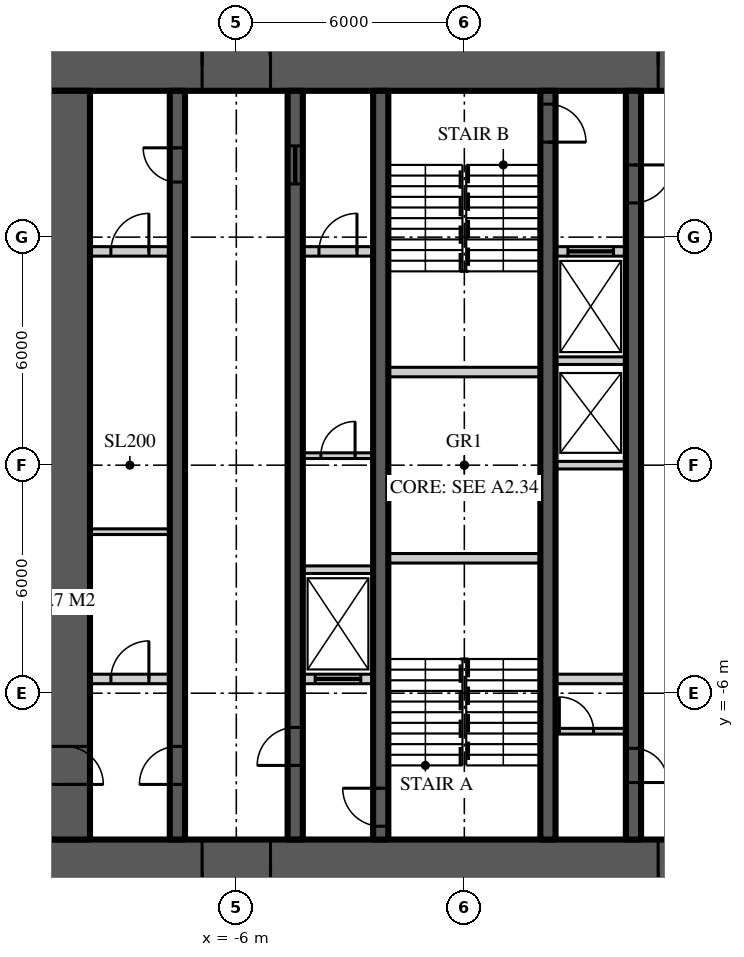
"""IFC4 building model, lengths in metres.
Left out: names, types, materials, properties, quantities, classifications, styles, units other than length and angle.
Written with IfcOpenShell. Run it as: python <this file> out.ifc"""

import sys

from ifc_helpers import new_model, si_unit, direction, frame, frame_2d, origin, place, context, subcontext, project, spatial, rectangle, extrude, element, fill, save


model = new_model("IFC4")
c1 = context("Model", 3, precision=1e-05, world=origin(), true_north=direction((0.0, 1.0)))
c2 = subcontext(c1, "Body", "Model", "MODEL_VIEW")
j1 = project(units=[si_unit("LENGTHUNIT", "METRE"), si_unit("PLANEANGLEUNIT", "RADIAN")], contexts=[c1])
p1 = place(None, origin())
s1 = spatial("IfcSite", under=j1, at=p1, CompositionType="ELEMENT")
p2 = place(p1, origin())
s2 = spatial("IfcBuilding", under=s1, at=p2, CompositionType="ELEMENT")
p3 = place(p2, frame((0.0, 0.0, 263.4)))
s3 = spatial("IfcBuildingStorey", under=s2, at=p3, CompositionType="ELEMENT", Elevation=263.4)
p4 = place(p3, frame((-11.15, 10.5, 0.0), z_axis=(0.0, 0.0, 1.0), x_axis=(1.0, 0.0, 0.0)))
e1 = element("IfcWall", 1, at=p4, inside=s3, PredefinedType="SHEAR", context=c2, shape_type="SweptSolid", body=[
    extrude(rectangle(XDim=22.3, YDim=1.3, at=frame_2d((11.15, 0.0))), origin(), (0.0, 0.0, 1.0), 3.9),
])
p5 = place(p4, frame((4.25, 0.0, 0.0)))
e2 = element("IfcOpeningElement", 2, at=p5, cuts=e1, PredefinedType="OPENING", context=c2, shape_type="SweptSolid", body=[
    extrude(rectangle(XDim=1.8, YDim=2.2, at=frame_2d((0.9, 1.1))), frame((0.0, 0.66, 0.0), z_axis=(0.0, -1.0, 0.0), x_axis=(1.0, 0.0, 0.0)), (0.0, 0.0, 1.0), 1.32),
])
p6 = place(p4, frame((16.25, 0.0, 0.0)))
e3 = element("IfcOpeningElement", 3, at=p6, cuts=e1, PredefinedType="OPENING", context=c2, shape_type="SweptSolid", body=[
    extrude(rectangle(XDim=1.8, YDim=2.2, at=frame_2d((0.9, 1.1))), frame((0.0, 0.66, 0.0), z_axis=(0.0, -1.0, 0.0), x_axis=(1.0, 0.0, 0.0)), (0.0, 0.0, 1.0), 1.32),
])
p7 = place(p3, frame((11.15, -10.5, 0.0), z_axis=(0.0, 0.0, 1.0), x_axis=(-1.0, 0.0, 0.0)))
e4 = element("IfcWall", 4, at=p7, inside=s3, PredefinedType="SHEAR", context=c2, shape_type="SweptSolid", body=[
    extrude(rectangle(XDim=22.3, YDim=1.3, at=frame_2d((11.15, 0.0))), origin(), (0.0, 0.0, 1.0), 3.9),
])
p8 = place(p7, frame((16.25, 0.0, 0.0)))
e5 = element("IfcOpeningElement", 5, at=p8, cuts=e4, PredefinedType="OPENING", context=c2, shape_type="SweptSolid", body=[
    extrude(rectangle(XDim=1.8, YDim=2.2, at=frame_2d((0.9, 1.1))), frame((0.0, 0.66, 0.0), z_axis=(0.0, -1.0, 0.0), x_axis=(1.0, 0.0, 0.0)), (0.0, 0.0, 1.0), 1.32),
])
p9 = place(p7, frame((4.25, 0.0, 0.0)))
e6 = element("IfcOpeningElement", 6, at=p9, cuts=e4, PredefinedType="OPENING", context=c2, shape_type="SweptSolid", body=[
    extrude(rectangle(XDim=1.8, YDim=2.2, at=frame_2d((0.9, 1.1))), frame((0.0, 0.66, 0.0), z_axis=(0.0, -1.0, 0.0), x_axis=(1.0, 0.0, 0.0)), (0.0, 0.0, 1.0), 1.32),
])
p10 = place(p3, frame((-10.5, 9.85, 0.0), z_axis=(0.0, 0.0, 1.0), x_axis=(0.0, -1.0, 0.0)))
e7 = element("IfcWall", 7, at=p10, inside=s3, PredefinedType="SHEAR", context=c2, shape_type="SweptSolid", body=[
    extrude(rectangle(XDim=19.7, YDim=1.3, at=frame_2d((9.85, 0.0))), origin(), (0.0, 0.0, 1.0), 3.9),
])
p11 = place(p10, frame((17.25, 0.0, 0.0)))
e8 = element("IfcOpeningElement", 8, at=p11, cuts=e7, PredefinedType="OPENING", context=c2, shape_type="SweptSolid", body=[
    extrude(rectangle(XDim=1.0, YDim=2.2, at=frame_2d((0.5, 1.1))), frame((0.0, 0.66, 0.0), z_axis=(0.0, -1.0, 0.0), x_axis=(1.0, 0.0, 0.0)), (0.0, 0.0, 1.0), 1.32),
])
p12 = place(p3, frame((-7.55, -9.85, 0.0), z_axis=(0.0, 0.0, 1.0), x_axis=(0.0, 1.0, 0.0)))
e9 = element("IfcWall", 9, at=p12, inside=s3, PredefinedType="SHEAR", context=c2, shape_type="SweptSolid", body=[
    extrude(rectangle(XDim=19.7, YDim=0.4, at=frame_2d((9.85, 0.0))), origin(), (0.0, 0.0, 1.0), 3.9),
])
p13 = place(p12, frame((1.45, 0.0, 0.0)))
e10 = element("IfcOpeningElement", 10, at=p13, cuts=e9, PredefinedType="OPENING", context=c2, shape_type="SweptSolid", body=[
    extrude(rectangle(XDim=1.0, YDim=2.2, at=frame_2d((0.5, 1.1))), frame((0.0, 0.21, 0.0), z_axis=(0.0, -1.0, 0.0), x_axis=(1.0, 0.0, 0.0)), (0.0, 0.0, 1.0), 0.42),
])
p14 = place(p12, frame((17.3, 0.0, 0.0)))
e11 = element("IfcOpeningElement", 11, at=p14, cuts=e9, PredefinedType="OPENING", context=c2, shape_type="SweptSolid", body=[
    extrude(rectangle(XDim=0.9, YDim=2.1, at=frame_2d((0.45, 1.05))), frame((0.0, 0.21, 0.0), z_axis=(0.0, -1.0, 0.0), x_axis=(1.0, 0.0, 0.0)), (0.0, 0.0, 1.0), 0.42),
])
p15 = place(p3, frame((-4.45, -9.85, 0.0), z_axis=(0.0, 0.0, 1.0), x_axis=(0.0, 1.0, 0.0)))
e12 = element("IfcWall", 12, at=p15, inside=s3, PredefinedType="SHEAR", context=c2, shape_type="SweptSolid", body=[
    extrude(rectangle(XDim=19.7, YDim=0.4, at=frame_2d((9.85, 0.0))), origin(), (0.0, 0.0, 1.0), 3.9),
])
p16 = place(p15, frame((1.95, 0.0, 0.0)))
e13 = element("IfcOpeningElement", 13, at=p16, cuts=e12, PredefinedType="OPENING", context=c2, shape_type="SweptSolid", body=[
    extrude(rectangle(XDim=1.0, YDim=2.2, at=frame_2d((0.5, 1.1))), frame((0.0, 0.21, 0.0), z_axis=(0.0, -1.0, 0.0), x_axis=(1.0, 0.0, 0.0)), (0.0, 0.0, 1.0), 0.42),
])
p17 = place(p15, frame((17.25, 0.0, 0.0)))
e14 = element("IfcOpeningElement", 14, at=p17, cuts=e12, PredefinedType="OPENING", context=c2, shape_type="SweptSolid", body=[
    extrude(rectangle(XDim=1.0, YDim=2.1, at=frame_2d((0.5, 1.05))), frame((0.0, 0.21, 0.0), z_axis=(0.0, -1.0, 0.0), x_axis=(1.0, 0.0, 0.0)), (0.0, 0.0, 1.0), 0.42),
])
p18 = place(p3, frame((4.45, 9.85, 0.0), z_axis=(0.0, 0.0, 1.0), x_axis=(0.0, -1.0, 0.0)))
e15 = element("IfcWall", 15, at=p18, inside=s3, PredefinedType="SHEAR", context=c2, shape_type="SweptSolid", body=[
    extrude(rectangle(XDim=19.7, YDim=0.4, at=frame_2d((9.85, 0.0))), origin(), (0.0, 0.0, 1.0), 3.9),
])
p19 = place(p18, frame((1.95, 0.0, 0.0)))
e16 = element("IfcOpeningElement", 16, at=p19, cuts=e15, PredefinedType="OPENING", context=c2, shape_type="SweptSolid", body=[
    extrude(rectangle(XDim=1.0, YDim=2.2, at=frame_2d((0.5, 1.1))), frame((0.0, 0.21, 0.0), z_axis=(0.0, -1.0, 0.0), x_axis=(1.0, 0.0, 0.0)), (0.0, 0.0, 1.0), 0.42),
])
p20 = place(p18, frame((17.3, 0.0, 0.0)))
e17 = element("IfcOpeningElement", 17, at=p20, cuts=e15, PredefinedType="OPENING", context=c2, shape_type="SweptSolid", body=[
    extrude(rectangle(XDim=0.9, YDim=2.1, at=frame_2d((0.45, 1.05))), frame((0.0, 0.21, 0.0), z_axis=(0.0, -1.0, 0.0), x_axis=(1.0, 0.0, 0.0)), (0.0, 0.0, 1.0), 0.42),
])
p21 = place(p3, frame((-2.2, -9.85, 0.0), z_axis=(0.0, 0.0, 1.0), x_axis=(0.0, 1.0, 0.0)))
e18 = element("IfcWall", 18, at=p21, inside=s3, PredefinedType="SHEAR", context=c2, shape_type="SweptSolid", body=[
    extrude(rectangle(XDim=19.7, YDim=0.4, at=frame_2d((9.85, 0.0))), origin(), (0.0, 0.0, 1.0), 3.9),
])
p22 = place(p21, frame((0.35, 0.0, 0.0)))
e19 = element("IfcOpeningElement", 19, at=p22, cuts=e18, PredefinedType="OPENING", context=c2, shape_type="SweptSolid", body=[
    extrude(rectangle(XDim=1.0, YDim=2.2, at=frame_2d((0.5, 1.1))), frame((0.0, 0.21, 0.0), z_axis=(0.0, -1.0, 0.0), x_axis=(1.0, 0.0, 0.0)), (0.0, 0.0, 1.0), 0.42),
])
p23 = place(p3, frame((2.2, 9.85, 0.0), z_axis=(0.0, 0.0, 1.0), x_axis=(0.0, -1.0, 0.0)))
e20 = element("IfcWall", 20, at=p23, inside=s3, PredefinedType="SHEAR", context=c2, shape_type="SweptSolid", body=[
    extrude(rectangle(XDim=19.7, YDim=0.4, at=frame_2d((9.85, 0.0))), origin(), (0.0, 0.0, 1.0), 3.9),
])
p24 = place(p23, frame((0.35, 0.0, 0.0)))
e21 = element("IfcOpeningElement", 21, at=p24, cuts=e20, PredefinedType="OPENING", context=c2, shape_type="SweptSolid", body=[
    extrude(rectangle(XDim=1.0, YDim=2.2, at=frame_2d((0.5, 1.1))), frame((0.0, 0.21, 0.0), z_axis=(0.0, -1.0, 0.0), x_axis=(1.0, 0.0, 0.0)), (0.0, 0.0, 1.0), 0.42),
])
p25 = place(p3, frame((-9.85, 5.625, 0.0), z_axis=(0.0, 0.0, 1.0), x_axis=(1.0, 0.0, 0.0)))
e22 = element("IfcWall", 22, at=p25, inside=s3, PredefinedType="SOLIDWALL", context=c2, shape_type="SweptSolid", body=[
    extrude(rectangle(XDim=2.1, YDim=0.25, at=frame_2d((1.05, 0.0))), origin(), (0.0, 0.0, 1.0), 3.7),
])
p26 = place(p25, frame((0.55, 0.0, 0.0)))
e23 = element("IfcOpeningElement", 23, at=p26, cuts=e22, PredefinedType="OPENING", context=c2, shape_type="SweptSolid", body=[
    extrude(rectangle(XDim=1.0, YDim=2.2, at=frame_2d((0.5, 1.1))), frame((0.0, 0.135, 0.0), z_axis=(0.0, -1.0, 0.0), x_axis=(1.0, 0.0, 0.0)), (0.0, 0.0, 1.0), 0.27),
])
p27 = place(p3, frame((-4.25, 5.625, 0.0), z_axis=(0.0, 0.0, 1.0), x_axis=(1.0, 0.0, 0.0)))
e24 = element("IfcWall", 24, at=p27, inside=s3, PredefinedType="SOLIDWALL", context=c2, shape_type="SweptSolid", body=[
    extrude(rectangle(XDim=1.85, YDim=0.25, at=frame_2d((0.925, 0.0))), origin(), (0.0, 0.0, 1.0), 3.7),
])
p28 = place(p27, frame((0.425, 0.0, 0.0)))
e25 = element("IfcOpeningElement", 25, at=p28, cuts=e24, PredefinedType="OPENING", context=c2, shape_type="SweptSolid", body=[
    extrude(rectangle(XDim=1.0, YDim=2.2, at=frame_2d((0.5, 1.1))), frame((0.0, 0.135, 0.0), z_axis=(0.0, -1.0, 0.0), x_axis=(1.0, 0.0, 0.0)), (0.0, 0.0, 1.0), 0.27),
])
p29 = place(p3, frame((2.4, 5.625, 0.0), z_axis=(0.0, 0.0, 1.0), x_axis=(1.0, 0.0, 0.0)))
e26 = element("IfcWall", 26, at=p29, inside=s3, PredefinedType="SOLIDWALL", context=c2, shape_type="SweptSolid", body=[
    extrude(rectangle(XDim=1.85, YDim=0.25, at=frame_2d((0.925, 0.0))), origin(), (0.0, 0.0, 1.0), 3.7),
])
p30 = place(p29, frame((0.325, 0.0, 0.0)))
e27 = element("IfcOpeningElement", 27, at=p30, cuts=e26, PredefinedType="OPENING", context=c2, shape_type="SweptSolid", body=[
    extrude(rectangle(XDim=1.2, YDim=2.2, at=frame_2d((0.6, 1.1))), frame((0.0, 0.135, 0.0), z_axis=(0.0, -1.0, 0.0), x_axis=(1.0, 0.0, 0.0)), (0.0, 0.0, 1.0), 0.27),
])
p31 = place(p3, frame((-9.85, -5.625, 0.0), z_axis=(0.0, 0.0, 1.0), x_axis=(1.0, 0.0, 0.0)))
e28 = element("IfcWall", 28, at=p31, inside=s3, PredefinedType="SOLIDWALL", context=c2, shape_type="SweptSolid", body=[
    extrude(rectangle(XDim=2.1, YDim=0.25, at=frame_2d((1.05, 0.0))), origin(), (0.0, 0.0, 1.0), 3.7),
])
p32 = place(p31, frame((0.55, 0.0, 0.0)))
e29 = element("IfcOpeningElement", 29, at=p32, cuts=e28, PredefinedType="OPENING", context=c2, shape_type="SweptSolid", body=[
    extrude(rectangle(XDim=1.0, YDim=2.2, at=frame_2d((0.5, 1.1))), frame((0.0, 0.135, 0.0), z_axis=(0.0, -1.0, 0.0), x_axis=(1.0, 0.0, 0.0)), (0.0, 0.0, 1.0), 0.27),
])
p33 = place(p3, frame((-4.25, -5.625, 0.0), z_axis=(0.0, 0.0, 1.0), x_axis=(1.0, 0.0, 0.0)))
e30 = element("IfcWall", 30, at=p33, inside=s3, PredefinedType="SOLIDWALL", context=c2, shape_type="SweptSolid", body=[
    extrude(rectangle(XDim=1.85, YDim=0.25, at=frame_2d((0.925, 0.0))), origin(), (0.0, 0.0, 1.0), 3.7),
])
p34 = place(p33, frame((0.325, 0.0, 0.0)))
e31 = element("IfcOpeningElement", 31, at=p34, cuts=e30, PredefinedType="OPENING", context=c2, shape_type="SweptSolid", body=[
    extrude(rectangle(XDim=1.2, YDim=2.2, at=frame_2d((0.6, 1.1))), frame((0.0, 0.135, 0.0), z_axis=(0.0, -1.0, 0.0), x_axis=(1.0, 0.0, 0.0)), (0.0, 0.0, 1.0), 0.27),
])
p35 = place(p3, frame((2.4, -5.625, 0.0), z_axis=(0.0, 0.0, 1.0), x_axis=(1.0, 0.0, 0.0)))
e32 = element("IfcWall", 32, at=p35, inside=s3, PredefinedType="SOLIDWALL", context=c2, shape_type="SweptSolid", body=[
    extrude(rectangle(XDim=1.85, YDim=0.25, at=frame_2d((0.925, 0.0))), origin(), (0.0, 0.0, 1.0), 3.7),
])
for number, where, z_axis, x_axis in (
    (33, (-2.0, -2.45, 0.0), (0.0, 0.0, 1.0), (1.0, 0.0, 0.0)),
    (34, (-2.0, 2.45, 0.0), (0.0, 0.0, 1.0), (1.0, 0.0, 0.0)),
):
    element("IfcWall", number, at=place(p3, frame(where, z_axis=z_axis, x_axis=x_axis)), inside=s3, PredefinedType="SOLIDWALL", context=c2, shape_type="SweptSolid", body=[
        extrude(rectangle(XDim=4.0, YDim=0.25, at=frame_2d((2.0, 0.0))), origin(), (0.0, 0.0, 1.0), 3.7),
    ])
for number, where, z_axis, x_axis in (
    (35, (-4.25, -2.75, 0.0), (0.0, 0.0, 1.0), (1.0, 0.0, 0.0)),
    (36, (2.4, 0.0, 0.0), (0.0, 0.0, 1.0), (1.0, 0.0, 0.0)),
    (37, (2.4, 2.75, 0.0), (0.0, 0.0, 1.0), (1.0, 0.0, 0.0)),
):
    element("IfcWall", number, at=place(p3, frame(where, z_axis=z_axis, x_axis=x_axis)), inside=s3, PredefinedType="SOLIDWALL", context=c2, shape_type="SweptSolid", body=[
        extrude(rectangle(XDim=1.85, YDim=0.2, at=frame_2d((0.925, 0.0))), origin(), (0.0, 0.0, 1.0), 3.7),
    ])
p36 = place(p3, frame((-9.85, -1.75, 0.0), z_axis=(0.0, 0.0, 1.0), x_axis=(1.0, 0.0, 0.0)))
e38 = element("IfcWall", 38, at=p36, inside=s3, PredefinedType="SOLIDWALL", context=c2, shape_type="SweptSolid", body=[
    extrude(rectangle(XDim=2.1, YDim=0.15, at=frame_2d((1.05, 0.0))), origin(), (0.0, 0.0, 1.0), 3.77),
])
p37 = place(p3, frame((-4.25, 0.25, 0.0), z_axis=(0.0, 0.0, 1.0), x_axis=(1.0, 0.0, 0.0)))
e39 = element("IfcWall", 39, at=p37, inside=s3, PredefinedType="SOLIDWALL", context=c2, shape_type="SweptSolid", body=[
    extrude(rectangle(XDim=1.85, YDim=0.15, at=frame_2d((0.925, 0.0))), origin(), (0.0, 0.0, 1.0), 3.77),
])
p38 = place(p37, frame((0.475, 0.0, 0.0)))
e40 = element("IfcOpeningElement", 40, at=p38, cuts=e39, PredefinedType="OPENING", context=c2, shape_type="SweptSolid", body=[
    extrude(rectangle(XDim=0.9, YDim=2.1, at=frame_2d((0.45, 1.05))), frame((0.0, 0.085, 0.0), z_axis=(0.0, -1.0, 0.0), x_axis=(1.0, 0.0, 0.0)), (0.0, 0.0, 1.0), 0.17),
])
p39 = place(p3, frame((2.4, -7.0, 0.0), z_axis=(0.0, 0.0, 1.0), x_axis=(1.0, 0.0, 0.0)))
e41 = element("IfcWall", 41, at=p39, inside=s3, PredefinedType="SOLIDWALL", context=c2, shape_type="SweptSolid", body=[
    extrude(rectangle(XDim=1.85, YDim=0.15, at=frame_2d((0.925, 0.0))), origin(), (0.0, 0.0, 1.0), 3.77),
])
p40 = place(p39, frame((0.1, 0.0, 0.0)))
e42 = element("IfcOpeningElement", 42, at=p40, cuts=e41, PredefinedType="OPENING", context=c2, shape_type="SweptSolid", body=[
    extrude(rectangle(XDim=0.9, YDim=2.1, at=frame_2d((0.45, 1.05))), frame((0.0, 0.085, 0.0), z_axis=(0.0, -1.0, 0.0), x_axis=(1.0, 0.0, 0.0)), (0.0, 0.0, 1.0), 0.17),
])
p41 = place(p5, origin())
e43 = element("IfcDoor", 43, at=p41, inside=s3, OperationType="DOUBLE_DOOR_DOUBLE_SWING", PredefinedType="DOOR", context=c2, shape_type="SweptSolid", body=[
    extrude(rectangle(XDim=1.8, YDim=2.2, at=frame_2d((0.9, 1.1))), frame((0.0, 0.025, 0.0), z_axis=(0.0, -1.0, 0.0), x_axis=(1.0, 0.0, 0.0)), (0.0, 0.0, 1.0), 0.05),
])
fill(e2, e43)
p42 = place(p8, origin())
e44 = element("IfcDoor", 44, at=p42, inside=s3, OperationType="DOUBLE_DOOR_DOUBLE_SWING", PredefinedType="DOOR", context=c2, shape_type="SweptSolid", body=[
    extrude(rectangle(XDim=1.8, YDim=2.2, at=frame_2d((0.9, 1.1))), frame((0.0, 0.025, 0.0), z_axis=(0.0, -1.0, 0.0), x_axis=(1.0, 0.0, 0.0)), (0.0, 0.0, 1.0), 0.05),
])
fill(e5, e44)
p43 = place(p6, origin())
e45 = element("IfcDoor", 45, at=p43, inside=s3, OperationType="DOUBLE_DOOR_DOUBLE_SWING", PredefinedType="DOOR", context=c2, shape_type="SweptSolid", body=[
    extrude(rectangle(XDim=1.8, YDim=2.2, at=frame_2d((0.9, 1.1))), frame((0.0, 0.025, 0.0), z_axis=(0.0, -1.0, 0.0), x_axis=(1.0, 0.0, 0.0)), (0.0, 0.0, 1.0), 0.05),
])
fill(e3, e45)
p44 = place(p9, origin())
e46 = element("IfcDoor", 46, at=p44, inside=s3, OperationType="DOUBLE_DOOR_DOUBLE_SWING", PredefinedType="DOOR", context=c2, shape_type="SweptSolid", body=[
    extrude(rectangle(XDim=1.8, YDim=2.2, at=frame_2d((0.9, 1.1))), frame((0.0, 0.025, 0.0), z_axis=(0.0, -1.0, 0.0), x_axis=(1.0, 0.0, 0.0)), (0.0, 0.0, 1.0), 0.05),
])
fill(e6, e46)
p45 = place(p13, origin())
e47 = element("IfcDoor", 47, at=p45, inside=s3, OperationType="SINGLE_SWING_LEFT", PredefinedType="DOOR", context=c2, shape_type="SweptSolid", body=[
    extrude(rectangle(XDim=1.0, YDim=2.2, at=frame_2d((0.5, 1.1))), frame((0.0, 0.025, 0.0), z_axis=(0.0, -1.0, 0.0), x_axis=(1.0, 0.0, 0.0)), (0.0, 0.0, 1.0), 0.05),
])
fill(e10, e47)
p46 = place(p11, origin())
e48 = element("IfcDoor", 48, at=p46, inside=s3, OperationType="SINGLE_SWING_RIGHT", PredefinedType="DOOR", context=c2, shape_type="SweptSolid", body=[
    extrude(rectangle(XDim=1.0, YDim=2.2, at=frame_2d((0.5, 1.1))), frame((0.0, 0.025, 0.0), z_axis=(0.0, -1.0, 0.0), x_axis=(1.0, 0.0, 0.0)), (0.0, 0.0, 1.0), 0.05),
])
fill(e8, e48)
p47 = place(p16, origin())
e49 = element("IfcDoor", 49, at=p47, inside=s3, OperationType="SINGLE_SWING_LEFT", PredefinedType="DOOR", context=c2, shape_type="SweptSolid", body=[
    extrude(rectangle(XDim=1.0, YDim=2.2, at=frame_2d((0.5, 1.1))), frame((0.0, 0.025, 0.0), z_axis=(0.0, -1.0, 0.0), x_axis=(1.0, 0.0, 0.0)), (0.0, 0.0, 1.0), 0.05),
])
fill(e13, e49)
p48 = place(p22, origin())
e50 = element("IfcDoor", 50, at=p48, inside=s3, OperationType="SINGLE_SWING_RIGHT", PredefinedType="DOOR", context=c2, shape_type="SweptSolid", body=[
    extrude(rectangle(XDim=1.0, YDim=2.2, at=frame_2d((0.5, 1.1))), frame((0.0, 0.025, 0.0), z_axis=(0.0, -1.0, 0.0), x_axis=(1.0, 0.0, 0.0)), (0.0, 0.0, 1.0), 0.05),
])
fill(e19, e50)
p49 = place(p19, origin())
e51 = element("IfcDoor", 51, at=p49, inside=s3, OperationType="SINGLE_SWING_LEFT", PredefinedType="DOOR", context=c2, shape_type="SweptSolid", body=[
    extrude(rectangle(XDim=1.0, YDim=2.2, at=frame_2d((0.5, 1.1))), frame((0.0, 0.025, 0.0), z_axis=(0.0, -1.0, 0.0), x_axis=(1.0, 0.0, 0.0)), (0.0, 0.0, 1.0), 0.05),
])
fill(e16, e51)
p50 = place(p24, origin())
e52 = element("IfcDoor", 52, at=p50, inside=s3, OperationType="SINGLE_SWING_RIGHT", PredefinedType="DOOR", context=c2, shape_type="SweptSolid", body=[
    extrude(rectangle(XDim=1.0, YDim=2.2, at=frame_2d((0.5, 1.1))), frame((0.0, 0.025, 0.0), z_axis=(0.0, -1.0, 0.0), x_axis=(1.0, 0.0, 0.0)), (0.0, 0.0, 1.0), 0.05),
])
fill(e21, e52)
p51 = place(p14, origin())
e53 = element("IfcDoor", 53, at=p51, inside=s3, OperationType="SINGLE_SWING_RIGHT", PredefinedType="DOOR", context=c2, shape_type="SweptSolid", body=[
    extrude(rectangle(XDim=0.9, YDim=2.1, at=frame_2d((0.45, 1.05))), frame((0.0, 0.025, 0.0), z_axis=(0.0, -1.0, 0.0), x_axis=(1.0, 0.0, 0.0)), (0.0, 0.0, 1.0), 0.05),
])
fill(e11, e53)
p52 = place(p17, origin())
e54 = element("IfcDoor", 54, at=p52, inside=s3, OperationType="SLIDING_TO_LEFT", PredefinedType="DOOR", context=c2, shape_type="SweptSolid", body=[
    extrude(rectangle(XDim=1.0, YDim=2.1, at=frame_2d((0.5, 1.05))), frame((0.0, 0.025, 0.0), z_axis=(0.0, -1.0, 0.0), x_axis=(1.0, 0.0, 0.0)), (0.0, 0.0, 1.0), 0.05),
])
fill(e14, e54)
p53 = place(p20, origin())
e55 = element("IfcDoor", 55, at=p53, inside=s3, OperationType="SINGLE_SWING_RIGHT", PredefinedType="DOOR", context=c2, shape_type="SweptSolid", body=[
    extrude(rectangle(XDim=0.9, YDim=2.1, at=frame_2d((0.45, 1.05))), frame((0.0, 0.025, 0.0), z_axis=(0.0, -1.0, 0.0), x_axis=(1.0, 0.0, 0.0)), (0.0, 0.0, 1.0), 0.05),
])
fill(e17, e55)
p54 = place(p34, origin())
e56 = element("IfcDoor", 56, at=p54, inside=s3, OperationType="SLIDING_TO_LEFT", PredefinedType="DOOR", context=c2, shape_type="SweptSolid", body=[
    extrude(rectangle(XDim=1.2, YDim=2.2, at=frame_2d((0.6, 1.1))), frame((0.0, 0.025, 0.0), z_axis=(0.0, -1.0, 0.0), x_axis=(1.0, 0.0, 0.0)), (0.0, 0.0, 1.0), 0.05),
])
fill(e31, e56)
p55 = place(p30, origin())
e57 = element("IfcDoor", 57, at=p55, inside=s3, OperationType="SLIDING_TO_LEFT", PredefinedType="DOOR", context=c2, shape_type="SweptSolid", body=[
    extrude(rectangle(XDim=1.2, YDim=2.2, at=frame_2d((0.6, 1.1))), frame((0.0, 0.025, 0.0), z_axis=(0.0, -1.0, 0.0), x_axis=(1.0, 0.0, 0.0)), (0.0, 0.0, 1.0), 0.05),
])
fill(e27, e57)
p56 = place(p26, origin())
e58 = element("IfcDoor", 58, at=p56, inside=s3, OperationType="SINGLE_SWING_RIGHT", PredefinedType="DOOR", context=c2, shape_type="SweptSolid", body=[
    extrude(rectangle(XDim=1.0, YDim=2.2, at=frame_2d((0.5, 1.1))), frame((0.0, 0.025, 0.0), z_axis=(0.0, -1.0, 0.0), x_axis=(1.0, 0.0, 0.0)), (0.0, 0.0, 1.0), 0.05),
])
fill(e23, e58)
p57 = place(p32, origin())
e59 = element("IfcDoor", 59, at=p57, inside=s3, OperationType="SINGLE_SWING_RIGHT", PredefinedType="DOOR", context=c2, shape_type="SweptSolid", body=[
    extrude(rectangle(XDim=1.0, YDim=2.2, at=frame_2d((0.5, 1.1))), frame((0.0, 0.025, 0.0), z_axis=(0.0, -1.0, 0.0), x_axis=(1.0, 0.0, 0.0)), (0.0, 0.0, 1.0), 0.05),
])
fill(e29, e59)
p58 = place(p38, origin())
e60 = element("IfcDoor", 60, at=p58, inside=s3, OperationType="SINGLE_SWING_RIGHT", PredefinedType="DOOR", context=c2, shape_type="SweptSolid", body=[
    extrude(rectangle(XDim=0.9, YDim=2.1, at=frame_2d((0.45, 1.05))), frame((0.0, 0.025, 0.0), z_axis=(0.0, -1.0, 0.0), x_axis=(1.0, 0.0, 0.0)), (0.0, 0.0, 1.0), 0.05),
])
fill(e40, e60)
p59 = place(p28, origin())
e61 = element("IfcDoor", 61, at=p59, inside=s3, OperationType="SINGLE_SWING_RIGHT", PredefinedType="DOOR", context=c2, shape_type="SweptSolid", body=[
    extrude(rectangle(XDim=1.0, YDim=2.2, at=frame_2d((0.5, 1.1))), frame((0.0, 0.025, 0.0), z_axis=(0.0, -1.0, 0.0), x_axis=(1.0, 0.0, 0.0)), (0.0, 0.0, 1.0), 0.05),
])
fill(e25, e61)
p60 = place(p40, origin())
e62 = element("IfcDoor", 62, at=p60, inside=s3, OperationType="SINGLE_SWING_LEFT", PredefinedType="DOOR", context=c2, shape_type="SweptSolid", body=[
    extrude(rectangle(XDim=0.9, YDim=2.1, at=frame_2d((0.45, 1.05))), frame((0.0, 0.025, 0.0), z_axis=(0.0, -1.0, 0.0), x_axis=(1.0, 0.0, 0.0)), (0.0, 0.0, 1.0), 0.05),
])
fill(e42, e62)
save(model, sys.argv[1])
